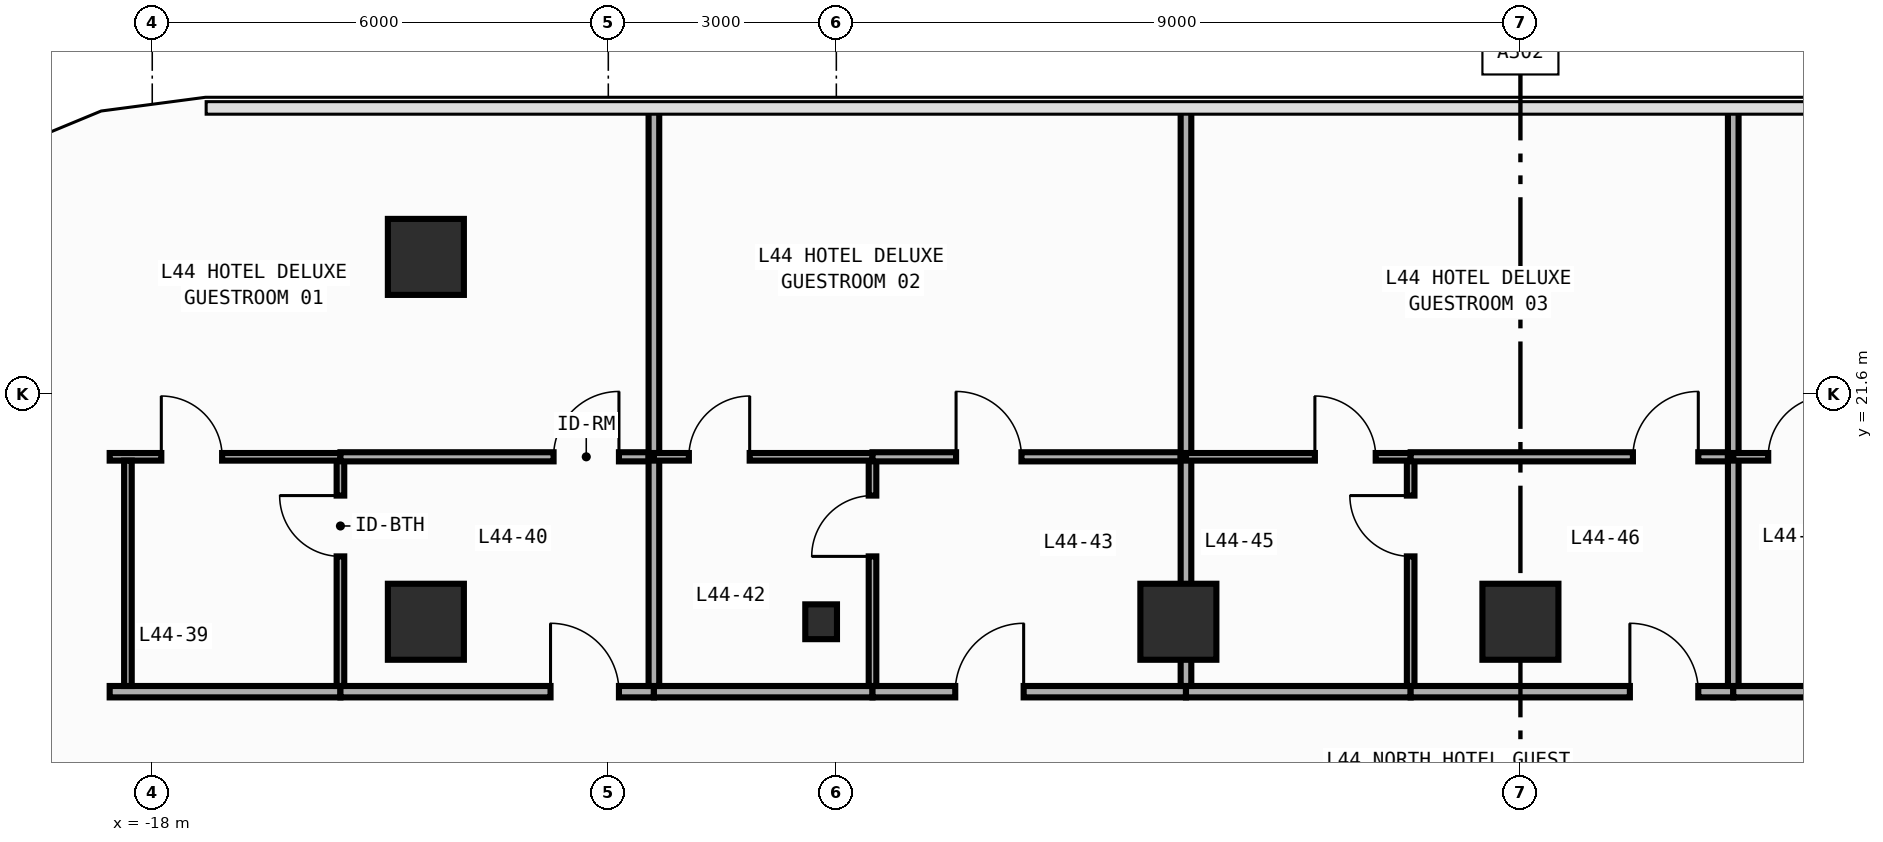
"""IFC4 building model, lengths in metres.
Left out: names, types, materials, properties, quantities, classifications, styles, units other than length and angle.
Written with IfcOpenShell. Run it as: python <this file> out.ifc"""

import sys

from ifc_helpers import new_model, si_unit, direction, frame, frame_2d, origin, origin_2d, place, context, subcontext, project, spatial, rectangle, i_section, extrude, element, fill, save


model = new_model("IFC4")
c1 = context("Model", 3, precision=1e-05, world=origin(), true_north=direction((0.0, 1.0)))
c2 = subcontext(c1, "Body", "Model", "MODEL_VIEW")
j1 = project(units=[si_unit("LENGTHUNIT", "METRE"), si_unit("PLANEANGLEUNIT", "RADIAN")], contexts=[c1])
p1 = place(None, origin())
s1 = spatial("IfcSite", under=j1, at=p1, CompositionType="ELEMENT")
p2 = place(p1, origin())
s2 = spatial("IfcBuilding", under=s1, at=p2, CompositionType="ELEMENT")
p3 = place(p2, frame((0.0, 0.0, 191.6)))
s3 = spatial("IfcBuildingStorey", under=s2, at=p3, CompositionType="ELEMENT", Elevation=191.6)
p4 = place(p3, frame((-9.2, 18.6, 0.0), z_axis=(0.0, 0.0, 1.0), x_axis=(1.0, 0.0, 0.0)))
e1 = element("IfcColumn", 1, at=p4, inside=s3, PredefinedType="COLUMN", context=c2, shape_type="SweptSolid", body=[
    extrude(i_section(OverallWidth=0.417, OverallDepth=0.458, WebThickness=0.03, FlangeThickness=0.05, FilletRadius=0.022, at=origin_2d()), origin(), (0.0, 0.0, 1.0), 3.8),
])
for number, where, z_axis, x_axis in (
    (2, (-14.4, 18.6, 0.0), (0.0, 0.0, 1.0), (1.0, 0.0, 0.0)),
    (3, (-4.5, 18.6, 0.0), (0.0, 0.0, 1.0), (1.0, 0.0, 0.0)),
    (4, (0.0, 18.6, 0.0), (0.0, 0.0, 1.0), (1.0, 0.0, 0.0)),
    (5, (-14.4, 23.4, 0.0), (0.0, 0.0, 1.0), (1.0, 0.0, 0.0)),
):
    element("IfcColumn", number, at=place(p3, frame(where, z_axis=z_axis, x_axis=x_axis)), inside=s3, PredefinedType="COLUMN", context=c2, shape_type="SweptSolid", body=[
        extrude(rectangle(XDim=1.0, YDim=1.0, at=origin_2d()), origin(), (0.0, 0.0, 1.0), 3.8),
    ])
p5 = place(p3, frame((-18.56, 17.68, 0.0), z_axis=(0.0, 0.0, 1.0), x_axis=(1.0, 0.0, 0.0)))
e6 = element("IfcWall", 6, at=p5, inside=s3, PredefinedType="PARTITIONING", context=c2, shape_type="SweptSolid", body=[
    extrude(rectangle(XDim=3.036, YDim=0.15, at=frame_2d((1.518, 0.0))), origin(), (0.0, 0.0, 1.0), 3.54),
])
p6 = place(p3, frame((-15.524, 17.68, 0.0), z_axis=(0.0, 0.0, 1.0), x_axis=(1.0, 0.0, 0.0)))
e7 = element("IfcWall", 7, at=p6, inside=s3, PredefinedType="PARTITIONING", context=c2, shape_type="SweptSolid", body=[
    extrude(rectangle(XDim=4.124, YDim=0.15, at=frame_2d((2.062, 0.0))), origin(), (0.0, 0.0, 1.0), 3.54),
])
p7 = place(p6, frame((2.764, 0.0, 0.0)))
e8 = element("IfcOpeningElement", 8, at=p7, cuts=e7, PredefinedType="OPENING", context=c2, shape_type="SweptSolid", body=[
    extrude(rectangle(XDim=0.9, YDim=2.15, at=frame_2d((0.45, 1.075))), frame((0.0, 0.085, 0.0), z_axis=(0.0, -1.0, 0.0), x_axis=(1.0, 0.0, 0.0)), (0.0, 0.0, 1.0), 0.17),
])
p8 = place(p3, frame((-11.4, 17.68, 0.0), z_axis=(0.0, 0.0, 1.0), x_axis=(1.0, 0.0, 0.0)))
e9 = element("IfcWall", 9, at=p8, inside=s3, PredefinedType="PARTITIONING", context=c2, shape_type="SweptSolid", body=[
    extrude(rectangle(XDim=2.876, YDim=0.15, at=frame_2d((1.438, 0.0))), origin(), (0.0, 0.0, 1.0), 3.54),
])
p9 = place(p3, frame((-8.524, 17.68, 0.0), z_axis=(0.0, 0.0, 1.0), x_axis=(1.0, 0.0, 0.0)))
e10 = element("IfcWall", 10, at=p9, inside=s3, PredefinedType="PARTITIONING", context=c2, shape_type="SweptSolid", body=[
    extrude(rectangle(XDim=4.124, YDim=0.15, at=frame_2d((2.062, 0.0))), origin(), (0.0, 0.0, 1.0), 3.54),
])
p10 = place(p9, frame((1.088, 0.0, 0.0)))
e11 = element("IfcOpeningElement", 11, at=p10, cuts=e10, PredefinedType="OPENING", context=c2, shape_type="SweptSolid", body=[
    extrude(rectangle(XDim=0.9, YDim=2.15, at=frame_2d((0.45, 1.075))), frame((0.0, 0.085, 0.0), z_axis=(0.0, -1.0, 0.0), x_axis=(1.0, 0.0, 0.0)), (0.0, 0.0, 1.0), 0.17),
])
p11 = place(p3, frame((-4.4, 17.68, 0.0), z_axis=(0.0, 0.0, 1.0), x_axis=(1.0, 0.0, 0.0)))
e12 = element("IfcWall", 12, at=p11, inside=s3, PredefinedType="PARTITIONING", context=c2, shape_type="SweptSolid", body=[
    extrude(rectangle(XDim=2.956, YDim=0.15, at=frame_2d((1.478, 0.0))), origin(), (0.0, 0.0, 1.0), 3.54),
])
p12 = place(p3, frame((-1.444, 17.68, 0.0), z_axis=(0.0, 0.0, 1.0), x_axis=(1.0, 0.0, 0.0)))
e13 = element("IfcWall", 13, at=p12, inside=s3, PredefinedType="PARTITIONING", context=c2, shape_type="SweptSolid", body=[
    extrude(rectangle(XDim=4.244, YDim=0.15, at=frame_2d((2.122, 0.0))), origin(), (0.0, 0.0, 1.0), 3.54),
])
p13 = place(p12, frame((2.884, 0.0, 0.0)))
e14 = element("IfcOpeningElement", 14, at=p13, cuts=e13, PredefinedType="OPENING", context=c2, shape_type="SweptSolid", body=[
    extrude(rectangle(XDim=0.9, YDim=2.15, at=frame_2d((0.45, 1.075))), frame((0.0, 0.085, 0.0), z_axis=(0.0, -1.0, 0.0), x_axis=(1.0, 0.0, 0.0)), (0.0, 0.0, 1.0), 0.17),
])
p14 = place(p3, frame((2.8, 17.68, 0.0), z_axis=(0.0, 0.0, 1.0), x_axis=(1.0, 0.0, 0.0)))
e15 = element("IfcWall", 15, at=p14, inside=s3, PredefinedType="PARTITIONING", context=c2, shape_type="SweptSolid", body=[
    extrude(rectangle(XDim=2.996, YDim=0.15, at=frame_2d((1.498, 0.0))), origin(), (0.0, 0.0, 1.0), 3.54),
])
p15 = place(p3, frame((-15.524, 17.755, 0.0), z_axis=(0.0, 0.0, 1.0), x_axis=(0.0, 1.0, 0.0)))
e16 = element("IfcWall", 16, at=p15, inside=s3, PredefinedType="PARTITIONING", context=c2, shape_type="SweptSolid", body=[
    extrude(rectangle(XDim=2.965, YDim=0.1, at=frame_2d((1.482, 0.0))), origin(), (0.0, 0.0, 1.0), 3.54),
])
p16 = place(p15, frame((1.705, 0.0, 0.0)))
e17 = element("IfcOpeningElement", 17, at=p16, cuts=e16, PredefinedType="OPENING", context=c2, shape_type="SweptSolid", body=[
    extrude(rectangle(XDim=0.8, YDim=2.1, at=frame_2d((0.4, 1.05))), frame((0.0, 0.06, 0.0), z_axis=(0.0, -1.0, 0.0), x_axis=(1.0, 0.0, 0.0)), (0.0, 0.0, 1.0), 0.12),
])
p17 = place(p3, frame((-18.56, 20.77, 0.0), z_axis=(0.0, 0.0, 1.0), x_axis=(1.0, 0.0, 0.0)))
e18 = element("IfcWall", 18, at=p17, inside=s3, PredefinedType="PARTITIONING", context=c2, shape_type="SweptSolid", body=[
    extrude(rectangle(XDim=3.036, YDim=0.1, at=frame_2d((1.518, 0.0))), origin(), (0.0, 0.0, 1.0), 3.54),
])
p18 = place(p17, frame((0.679, 0.0, 0.0)))
e19 = element("IfcOpeningElement", 19, at=p18, cuts=e18, PredefinedType="OPENING", context=c2, shape_type="SweptSolid", body=[
    extrude(rectangle(XDim=0.8, YDim=2.1, at=frame_2d((0.4, 1.05))), frame((0.0, 0.06, 0.0), z_axis=(0.0, -1.0, 0.0), x_axis=(1.0, 0.0, 0.0)), (0.0, 0.0, 1.0), 0.12),
])
p19 = place(p3, frame((-15.524, 20.77, 0.0), z_axis=(0.0, 0.0, 1.0), x_axis=(1.0, 0.0, 0.0)))
e20 = element("IfcWall", 20, at=p19, inside=s3, PredefinedType="PARTITIONING", context=c2, shape_type="SweptSolid", body=[
    extrude(rectangle(XDim=4.124, YDim=0.12, at=frame_2d((2.062, 0.0))), origin(), (0.0, 0.0, 1.0), 3.54),
])
p20 = place(p19, frame((2.804, 0.0, 0.0)))
e21 = element("IfcOpeningElement", 21, at=p20, cuts=e20, PredefinedType="OPENING", context=c2, shape_type="SweptSolid", body=[
    extrude(rectangle(XDim=0.86, YDim=2.15, at=frame_2d((0.43, 1.075))), frame((0.0, 0.07, 0.0), z_axis=(0.0, -1.0, 0.0), x_axis=(1.0, 0.0, 0.0)), (0.0, 0.0, 1.0), 0.14),
])
p21 = place(p3, frame((-11.4, 17.755, 0.0), z_axis=(0.0, 0.0, 1.0), x_axis=(0.0, 1.0, 0.0)))
e22 = element("IfcWall", 22, at=p21, inside=s3, PredefinedType="PARTITIONING", context=c2, shape_type="SweptSolid", body=[
    extrude(rectangle(XDim=3.015, YDim=0.14, at=frame_2d((1.508, 0.0))), origin(), (0.0, 0.0, 1.0), 3.54),
])
p22 = place(p3, frame((-11.4, 20.77, 0.0), z_axis=(0.0, 0.0, 1.0), x_axis=(0.0, 1.0, 0.0)))
e23 = element("IfcWall", 23, at=p22, inside=s3, PredefinedType="PARTITIONING", context=c2, shape_type="SweptSolid", body=[
    extrude(rectangle(XDim=4.585, YDim=0.14, at=frame_2d((2.292, 0.0))), origin(), (0.0, 0.0, 1.0), 3.54),
])
p23 = place(p3, frame((-8.524, 17.755, 0.0), z_axis=(0.0, 0.0, 1.0), x_axis=(0.0, 1.0, 0.0)))
e24 = element("IfcWall", 24, at=p23, inside=s3, PredefinedType="PARTITIONING", context=c2, shape_type="SweptSolid", body=[
    extrude(rectangle(XDim=2.965, YDim=0.1, at=frame_2d((1.482, 0.0))), origin(), (0.0, 0.0, 1.0), 3.54),
])
p24 = place(p23, frame((1.705, 0.0, 0.0)))
e25 = element("IfcOpeningElement", 25, at=p24, cuts=e24, PredefinedType="OPENING", context=c2, shape_type="SweptSolid", body=[
    extrude(rectangle(XDim=0.8, YDim=2.1, at=frame_2d((0.4, 1.05))), frame((0.0, 0.06, 0.0), z_axis=(0.0, -1.0, 0.0), x_axis=(1.0, 0.0, 0.0)), (0.0, 0.0, 1.0), 0.12),
])
p25 = place(p3, frame((-11.4, 20.77, 0.0), z_axis=(0.0, 0.0, 1.0), x_axis=(1.0, 0.0, 0.0)))
e26 = element("IfcWall", 26, at=p25, inside=s3, PredefinedType="PARTITIONING", context=c2, shape_type="SweptSolid", body=[
    extrude(rectangle(XDim=2.876, YDim=0.1, at=frame_2d((1.438, 0.0))), origin(), (0.0, 0.0, 1.0), 3.54),
])
p26 = place(p25, frame((0.46, 0.0, 0.0)))
e27 = element("IfcOpeningElement", 27, at=p26, cuts=e26, PredefinedType="OPENING", context=c2, shape_type="SweptSolid", body=[
    extrude(rectangle(XDim=0.8, YDim=2.1, at=frame_2d((0.4, 1.05))), frame((0.0, 0.06, 0.0), z_axis=(0.0, -1.0, 0.0), x_axis=(1.0, 0.0, 0.0)), (0.0, 0.0, 1.0), 0.12),
])
p27 = place(p3, frame((-8.524, 20.77, 0.0), z_axis=(0.0, 0.0, 1.0), x_axis=(1.0, 0.0, 0.0)))
e28 = element("IfcWall", 28, at=p27, inside=s3, PredefinedType="PARTITIONING", context=c2, shape_type="SweptSolid", body=[
    extrude(rectangle(XDim=4.124, YDim=0.12, at=frame_2d((2.062, 0.0))), origin(), (0.0, 0.0, 1.0), 3.54),
])
p28 = place(p27, frame((1.099, 0.0, 0.0)))
e29 = element("IfcOpeningElement", 29, at=p28, cuts=e28, PredefinedType="OPENING", context=c2, shape_type="SweptSolid", body=[
    extrude(rectangle(XDim=0.86, YDim=2.15, at=frame_2d((0.43, 1.075))), frame((0.0, 0.07, 0.0), z_axis=(0.0, -1.0, 0.0), x_axis=(1.0, 0.0, 0.0)), (0.0, 0.0, 1.0), 0.14),
])
p29 = place(p3, frame((-4.4, 17.755, 0.0), z_axis=(0.0, 0.0, 1.0), x_axis=(0.0, 1.0, 0.0)))
e30 = element("IfcWall", 30, at=p29, inside=s3, PredefinedType="PARTITIONING", context=c2, shape_type="SweptSolid", body=[
    extrude(rectangle(XDim=3.015, YDim=0.14, at=frame_2d((1.508, 0.0))), origin(), (0.0, 0.0, 1.0), 3.54),
])
p30 = place(p3, frame((-4.4, 20.77, 0.0), z_axis=(0.0, 0.0, 1.0), x_axis=(0.0, 1.0, 0.0)))
e31 = element("IfcWall", 31, at=p30, inside=s3, PredefinedType="PARTITIONING", context=c2, shape_type="SweptSolid", body=[
    extrude(rectangle(XDim=4.585, YDim=0.14, at=frame_2d((2.292, 0.0))), origin(), (0.0, 0.0, 1.0), 3.54),
])
p31 = place(p3, frame((-1.444, 17.755, 0.0), z_axis=(0.0, 0.0, 1.0), x_axis=(0.0, 1.0, 0.0)))
e32 = element("IfcWall", 32, at=p31, inside=s3, PredefinedType="PARTITIONING", context=c2, shape_type="SweptSolid", body=[
    extrude(rectangle(XDim=2.965, YDim=0.1, at=frame_2d((1.482, 0.0))), origin(), (0.0, 0.0, 1.0), 3.54),
])
p32 = place(p31, frame((1.705, 0.0, 0.0)))
e33 = element("IfcOpeningElement", 33, at=p32, cuts=e32, PredefinedType="OPENING", context=c2, shape_type="SweptSolid", body=[
    extrude(rectangle(XDim=0.8, YDim=2.1, at=frame_2d((0.4, 1.05))), frame((0.0, 0.06, 0.0), z_axis=(0.0, -1.0, 0.0), x_axis=(1.0, 0.0, 0.0)), (0.0, 0.0, 1.0), 0.12),
])
p33 = place(p3, frame((-4.4, 20.77, 0.0), z_axis=(0.0, 0.0, 1.0), x_axis=(1.0, 0.0, 0.0)))
e34 = element("IfcWall", 34, at=p33, inside=s3, PredefinedType="PARTITIONING", context=c2, shape_type="SweptSolid", body=[
    extrude(rectangle(XDim=2.956, YDim=0.1, at=frame_2d((1.478, 0.0))), origin(), (0.0, 0.0, 1.0), 3.54),
])
p34 = place(p33, frame((1.696, 0.0, 0.0)))
e35 = element("IfcOpeningElement", 35, at=p34, cuts=e34, PredefinedType="OPENING", context=c2, shape_type="SweptSolid", body=[
    extrude(rectangle(XDim=0.8, YDim=2.1, at=frame_2d((0.4, 1.05))), frame((0.0, 0.06, 0.0), z_axis=(0.0, -1.0, 0.0), x_axis=(1.0, 0.0, 0.0)), (0.0, 0.0, 1.0), 0.12),
])
p35 = place(p3, frame((-1.444, 20.77, 0.0), z_axis=(0.0, 0.0, 1.0), x_axis=(1.0, 0.0, 0.0)))
e36 = element("IfcWall", 36, at=p35, inside=s3, PredefinedType="PARTITIONING", context=c2, shape_type="SweptSolid", body=[
    extrude(rectangle(XDim=4.244, YDim=0.12, at=frame_2d((2.122, 0.0))), origin(), (0.0, 0.0, 1.0), 3.54),
])
p36 = place(p35, frame((2.924, 0.0, 0.0)))
e37 = element("IfcOpeningElement", 37, at=p36, cuts=e36, PredefinedType="OPENING", context=c2, shape_type="SweptSolid", body=[
    extrude(rectangle(XDim=0.86, YDim=2.15, at=frame_2d((0.43, 1.075))), frame((0.0, 0.07, 0.0), z_axis=(0.0, -1.0, 0.0), x_axis=(1.0, 0.0, 0.0)), (0.0, 0.0, 1.0), 0.14),
])
p37 = place(p3, frame((2.8, 17.755, 0.0), z_axis=(0.0, 0.0, 1.0), x_axis=(0.0, 1.0, 0.0)))
e38 = element("IfcWall", 38, at=p37, inside=s3, PredefinedType="PARTITIONING", context=c2, shape_type="SweptSolid", body=[
    extrude(rectangle(XDim=3.015, YDim=0.14, at=frame_2d((1.508, 0.0))), origin(), (0.0, 0.0, 1.0), 3.54),
])
p38 = place(p3, frame((2.8, 20.77, 0.0), z_axis=(0.0, 0.0, 1.0), x_axis=(0.0, 1.0, 0.0)))
e39 = element("IfcWall", 39, at=p38, inside=s3, PredefinedType="PARTITIONING", context=c2, shape_type="SweptSolid", body=[
    extrude(rectangle(XDim=4.585, YDim=0.14, at=frame_2d((2.292, 0.0))), origin(), (0.0, 0.0, 1.0), 3.54),
])
p39 = place(p3, frame((2.8, 20.77, 0.0), z_axis=(0.0, 0.0, 1.0), x_axis=(1.0, 0.0, 0.0)))
e40 = element("IfcWall", 40, at=p39, inside=s3, PredefinedType="PARTITIONING", context=c2, shape_type="SweptSolid", body=[
    extrude(rectangle(XDim=2.996, YDim=0.1, at=frame_2d((1.498, 0.0))), origin(), (0.0, 0.0, 1.0), 3.54),
])
p40 = place(p39, frame((0.46, 0.0, 0.0)))
e41 = element("IfcOpeningElement", 41, at=p40, cuts=e40, PredefinedType="OPENING", context=c2, shape_type="SweptSolid", body=[
    extrude(rectangle(XDim=0.8, YDim=2.1, at=frame_2d((0.4, 1.05))), frame((0.0, 0.06, 0.0), z_axis=(0.0, -1.0, 0.0), x_axis=(1.0, 0.0, 0.0)), (0.0, 0.0, 1.0), 0.12),
])
p41 = place(p3, frame((-18.32, 17.755, 0.0), z_axis=(0.0, 0.0, 1.0), x_axis=(0.0, 1.0, 0.0)))
e42 = element("IfcWall", 42, at=p41, inside=s3, PredefinedType="PARTITIONING", context=c2, shape_type="SweptSolid", body=[
    extrude(rectangle(XDim=2.965, YDim=0.1, at=frame_2d((1.482, 0.0))), origin(), (0.0, 0.0, 1.0), 3.54),
])
p42 = place(p7, origin())
e43 = element("IfcDoor", 43, at=p42, inside=s3, OperationType="SINGLE_SWING_LEFT", PredefinedType="DOOR", context=c2, shape_type="SweptSolid", body=[
    extrude(rectangle(XDim=0.9, YDim=2.15, at=frame_2d((0.45, 1.075))), frame((0.0, 0.025, 0.0), z_axis=(0.0, -1.0, 0.0), x_axis=(1.0, 0.0, 0.0)), (0.0, 0.0, 1.0), 0.05),
])
fill(e8, e43)
p43 = place(p10, origin())
e44 = element("IfcDoor", 44, at=p43, inside=s3, OperationType="SINGLE_SWING_RIGHT", PredefinedType="DOOR", context=c2, shape_type="SweptSolid", body=[
    extrude(rectangle(XDim=0.9, YDim=2.15, at=frame_2d((0.45, 1.075))), frame((0.0, 0.025, 0.0), z_axis=(0.0, -1.0, 0.0), x_axis=(1.0, 0.0, 0.0)), (0.0, 0.0, 1.0), 0.05),
])
fill(e11, e44)
p44 = place(p13, origin())
e45 = element("IfcDoor", 45, at=p44, inside=s3, OperationType="SINGLE_SWING_LEFT", PredefinedType="DOOR", context=c2, shape_type="SweptSolid", body=[
    extrude(rectangle(XDim=0.9, YDim=2.15, at=frame_2d((0.45, 1.075))), frame((0.0, 0.025, 0.0), z_axis=(0.0, -1.0, 0.0), x_axis=(1.0, 0.0, 0.0)), (0.0, 0.0, 1.0), 0.05),
])
fill(e14, e45)
p45 = place(p16, origin())
e46 = element("IfcDoor", 46, at=p45, inside=s3, OperationType="SINGLE_SWING_RIGHT", PredefinedType="DOOR", context=c2, shape_type="SweptSolid", body=[
    extrude(rectangle(XDim=0.8, YDim=2.1, at=frame_2d((0.4, 1.05))), frame((0.0, 0.025, 0.0), z_axis=(0.0, -1.0, 0.0), x_axis=(1.0, 0.0, 0.0)), (0.0, 0.0, 1.0), 0.05),
])
fill(e17, e46)
p46 = place(p18, origin())
e47 = element("IfcDoor", 47, at=p46, inside=s3, OperationType="SINGLE_SWING_LEFT", PredefinedType="DOOR", context=c2, shape_type="SweptSolid", body=[
    extrude(rectangle(XDim=0.8, YDim=2.1, at=frame_2d((0.4, 1.05))), frame((0.0, 0.025, 0.0), z_axis=(0.0, -1.0, 0.0), x_axis=(1.0, 0.0, 0.0)), (0.0, 0.0, 1.0), 0.05),
])
fill(e19, e47)
p47 = place(p20, origin())
e48 = element("IfcDoor", 48, at=p47, inside=s3, OperationType="SINGLE_SWING_RIGHT", PredefinedType="DOOR", context=c2, shape_type="SweptSolid", body=[
    extrude(rectangle(XDim=0.86, YDim=2.15, at=frame_2d((0.43, 1.075))), frame((0.0, 0.025, 0.0), z_axis=(0.0, -1.0, 0.0), x_axis=(1.0, 0.0, 0.0)), (0.0, 0.0, 1.0), 0.05),
])
fill(e21, e48)
p48 = place(p24, origin())
e49 = element("IfcDoor", 49, at=p48, inside=s3, OperationType="SINGLE_SWING_LEFT", PredefinedType="DOOR", context=c2, shape_type="SweptSolid", body=[
    extrude(rectangle(XDim=0.8, YDim=2.1, at=frame_2d((0.4, 1.05))), frame((0.0, 0.025, 0.0), z_axis=(0.0, -1.0, 0.0), x_axis=(1.0, 0.0, 0.0)), (0.0, 0.0, 1.0), 0.05),
])
fill(e25, e49)
p49 = place(p26, origin())
e50 = element("IfcDoor", 50, at=p49, inside=s3, OperationType="SINGLE_SWING_RIGHT", PredefinedType="DOOR", context=c2, shape_type="SweptSolid", body=[
    extrude(rectangle(XDim=0.8, YDim=2.1, at=frame_2d((0.4, 1.05))), frame((0.0, 0.025, 0.0), z_axis=(0.0, -1.0, 0.0), x_axis=(1.0, 0.0, 0.0)), (0.0, 0.0, 1.0), 0.05),
])
fill(e27, e50)
p50 = place(p28, origin())
e51 = element("IfcDoor", 51, at=p50, inside=s3, OperationType="SINGLE_SWING_LEFT", PredefinedType="DOOR", context=c2, shape_type="SweptSolid", body=[
    extrude(rectangle(XDim=0.86, YDim=2.15, at=frame_2d((0.43, 1.075))), frame((0.0, 0.025, 0.0), z_axis=(0.0, -1.0, 0.0), x_axis=(1.0, 0.0, 0.0)), (0.0, 0.0, 1.0), 0.05),
])
fill(e29, e51)
p51 = place(p32, origin())
e52 = element("IfcDoor", 52, at=p51, inside=s3, OperationType="SINGLE_SWING_RIGHT", PredefinedType="DOOR", context=c2, shape_type="SweptSolid", body=[
    extrude(rectangle(XDim=0.8, YDim=2.1, at=frame_2d((0.4, 1.05))), frame((0.0, 0.025, 0.0), z_axis=(0.0, -1.0, 0.0), x_axis=(1.0, 0.0, 0.0)), (0.0, 0.0, 1.0), 0.05),
])
fill(e33, e52)
p52 = place(p34, origin())
e53 = element("IfcDoor", 53, at=p52, inside=s3, OperationType="SINGLE_SWING_LEFT", PredefinedType="DOOR", context=c2, shape_type="SweptSolid", body=[
    extrude(rectangle(XDim=0.8, YDim=2.1, at=frame_2d((0.4, 1.05))), frame((0.0, 0.025, 0.0), z_axis=(0.0, -1.0, 0.0), x_axis=(1.0, 0.0, 0.0)), (0.0, 0.0, 1.0), 0.05),
])
fill(e35, e53)
p53 = place(p36, origin())
e54 = element("IfcDoor", 54, at=p53, inside=s3, OperationType="SINGLE_SWING_RIGHT", PredefinedType="DOOR", context=c2, shape_type="SweptSolid", body=[
    extrude(rectangle(XDim=0.86, YDim=2.15, at=frame_2d((0.43, 1.075))), frame((0.0, 0.025, 0.0), z_axis=(0.0, -1.0, 0.0), x_axis=(1.0, 0.0, 0.0)), (0.0, 0.0, 1.0), 0.05),
])
fill(e37, e54)
p54 = place(p40, origin())
e55 = element("IfcDoor", 55, at=p54, inside=s3, OperationType="SINGLE_SWING_RIGHT", PredefinedType="DOOR", context=c2, shape_type="SweptSolid", body=[
    extrude(rectangle(XDim=0.8, YDim=2.1, at=frame_2d((0.4, 1.05))), frame((0.0, 0.025, 0.0), z_axis=(0.0, -1.0, 0.0), x_axis=(1.0, 0.0, 0.0)), (0.0, 0.0, 1.0), 0.05),
])
fill(e41, e55)
save(model, sys.argv[1])
